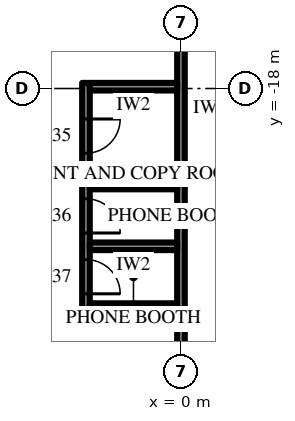
"""IFC4 building model, lengths in metres.
Left out: names, types, materials, properties, quantities, classifications, styles, units other than length and angle.
Written with IfcOpenShell. Run it as: python <this file> out.ifc"""

import sys

from ifc_helpers import new_model, si_unit, direction, frame, frame_2d, origin, place, context, subcontext, project, spatial, rectangle, extrude, element, fill, save


model = new_model("IFC4")
c1 = context("Model", 3, precision=1e-05, world=origin(), true_north=direction((0.0, 1.0)))
c2 = subcontext(c1, "Body", "Model", "MODEL_VIEW")
j1 = project(units=[si_unit("LENGTHUNIT", "METRE"), si_unit("PLANEANGLEUNIT", "RADIAN")], contexts=[c1])
p1 = place(None, origin())
s1 = spatial("IfcSite", under=j1, at=p1, CompositionType="ELEMENT")
p2 = place(p1, origin())
s2 = spatial("IfcBuilding", under=s1, at=p2, CompositionType="ELEMENT")
p3 = place(p2, frame((0.0, 0.0, 278.5)))
s3 = spatial("IfcBuildingStorey", under=s2, at=p3, CompositionType="ELEMENT", Elevation=278.5)
p4 = place(p3, frame((0.0, -12.3, 0.0), z_axis=(0.0, 0.0, 1.0), x_axis=(0.0, -1.0, 0.0)))
e1 = element("IfcWall", 1, at=p4, inside=s3, PredefinedType="PARTITIONING", context=c2, shape_type="SweptSolid", body=[
    extrude(rectangle(XDim=15.55, YDim=0.2, at=frame_2d((7.775, 0.0))), origin(), (0.0, 0.0, 1.0), 2.992),
])
p5 = place(p4, frame((1.055, 0.0, 0.0)))
e2 = element("IfcOpeningElement", 2, at=p5, cuts=e1, PredefinedType="OPENING", context=c2, shape_type="SweptSolid", body=[
    extrude(rectangle(XDim=1.0, YDim=2.2, at=frame_2d((0.5, 1.1))), frame((0.0, 0.11, 0.0), z_axis=(0.0, -1.0, 0.0), x_axis=(1.0, 0.0, 0.0)), (0.0, 0.0, 1.0), 0.22),
])
p6 = place(p3, frame((-2.5, -17.853, 0.0), z_axis=(0.0, 0.0, 1.0), x_axis=(0.0, -1.0, 0.0)))
e3 = element("IfcWall", 3, at=p6, inside=s3, PredefinedType="PARTITIONING", context=c2, shape_type="SweptSolid", body=[
    extrude(rectangle(XDim=6.0, YDim=0.2, at=frame_2d((3.0, 0.0))), origin(), (0.0, 0.0, 1.0), 4.0),
])
p7 = place(p6, frame((0.95, 0.0, 0.0)))
e4 = element("IfcOpeningElement", 4, at=p7, cuts=e3, PredefinedType="OPENING", context=c2, shape_type="SweptSolid", body=[
    extrude(rectangle(XDim=0.9, YDim=2.2, at=frame_2d((0.45, 1.1))), frame((0.0, 0.11, 0.0), z_axis=(0.0, -1.0, 0.0), x_axis=(1.0, 0.0, 0.0)), (0.0, 0.0, 1.0), 0.22),
])
p8 = place(p6, frame((3.05, 0.0, 0.0)))
e5 = element("IfcOpeningElement", 5, at=p8, cuts=e3, PredefinedType="OPENING", context=c2, shape_type="SweptSolid", body=[
    extrude(rectangle(XDim=0.9, YDim=2.2, at=frame_2d((0.45, 1.1))), frame((0.0, 0.11, 0.0), z_axis=(0.0, -1.0, 0.0), x_axis=(1.0, 0.0, 0.0)), (0.0, 0.0, 1.0), 0.22),
])
p9 = place(p6, frame((4.65, 0.0, 0.0)))
e6 = element("IfcOpeningElement", 6, at=p9, cuts=e3, PredefinedType="OPENING", context=c2, shape_type="SweptSolid", body=[
    extrude(rectangle(XDim=0.9, YDim=2.2, at=frame_2d((0.45, 1.1))), frame((0.0, 0.11, 0.0), z_axis=(0.0, -1.0, 0.0), x_axis=(1.0, 0.0, 0.0)), (0.0, 0.0, 1.0), 0.22),
])
for number, where, z_axis, x_axis in (
    (7, (-0.1, -17.952, 0.0), (0.0, 0.0, 1.0), (-1.0, 0.0, 0.0)),
    (8, (-0.1, -20.552, 0.0), (0.0, 0.0, 1.0), (-1.0, 0.0, 0.0)),
    (9, (-0.1, -22.153, 0.0), (0.0, 0.0, 1.0), (-1.0, 0.0, 0.0)),
    (10, (-0.1, -23.752, 0.0), (0.0, 0.0, 1.0), (-1.0, 0.0, 0.0)),
):
    element("IfcWall", number, at=place(p3, frame(where, z_axis=z_axis, x_axis=x_axis)), inside=s3, PredefinedType="PARTITIONING", context=c2, shape_type="SweptSolid", body=[
        extrude(rectangle(XDim=2.3, YDim=0.2, at=frame_2d((1.15, 0.0))), origin(), (0.0, 0.0, 1.0), 4.0),
    ])
p10 = place(p7, origin())
e11 = element("IfcDoor", 11, at=p10, inside=s3, OperationType="SINGLE_SWING_RIGHT", PredefinedType="DOOR", context=c2, shape_type="SweptSolid", body=[
    extrude(rectangle(XDim=0.9, YDim=2.2, at=frame_2d((0.45, 1.1))), frame((0.0, 0.025, 0.0), z_axis=(0.0, -1.0, 0.0), x_axis=(1.0, 0.0, 0.0)), (0.0, 0.0, 1.0), 0.05),
])
fill(e4, e11)
p11 = place(p8, origin())
e12 = element("IfcDoor", 12, at=p11, inside=s3, OperationType="SINGLE_SWING_LEFT", PredefinedType="DOOR", context=c2, shape_type="SweptSolid", body=[
    extrude(rectangle(XDim=0.9, YDim=2.2, at=frame_2d((0.45, 1.1))), frame((0.0, 0.025, 0.0), z_axis=(0.0, -1.0, 0.0), x_axis=(1.0, 0.0, 0.0)), (0.0, 0.0, 1.0), 0.05),
])
fill(e5, e12)
p12 = place(p9, origin())
e13 = element("IfcDoor", 13, at=p12, inside=s3, OperationType="SINGLE_SWING_LEFT", PredefinedType="DOOR", context=c2, shape_type="SweptSolid", body=[
    extrude(rectangle(XDim=0.9, YDim=2.2, at=frame_2d((0.45, 1.1))), frame((0.0, 0.025, 0.0), z_axis=(0.0, -1.0, 0.0), x_axis=(1.0, 0.0, 0.0)), (0.0, 0.0, 1.0), 0.05),
])
fill(e6, e13)
save(model, sys.argv[1])
